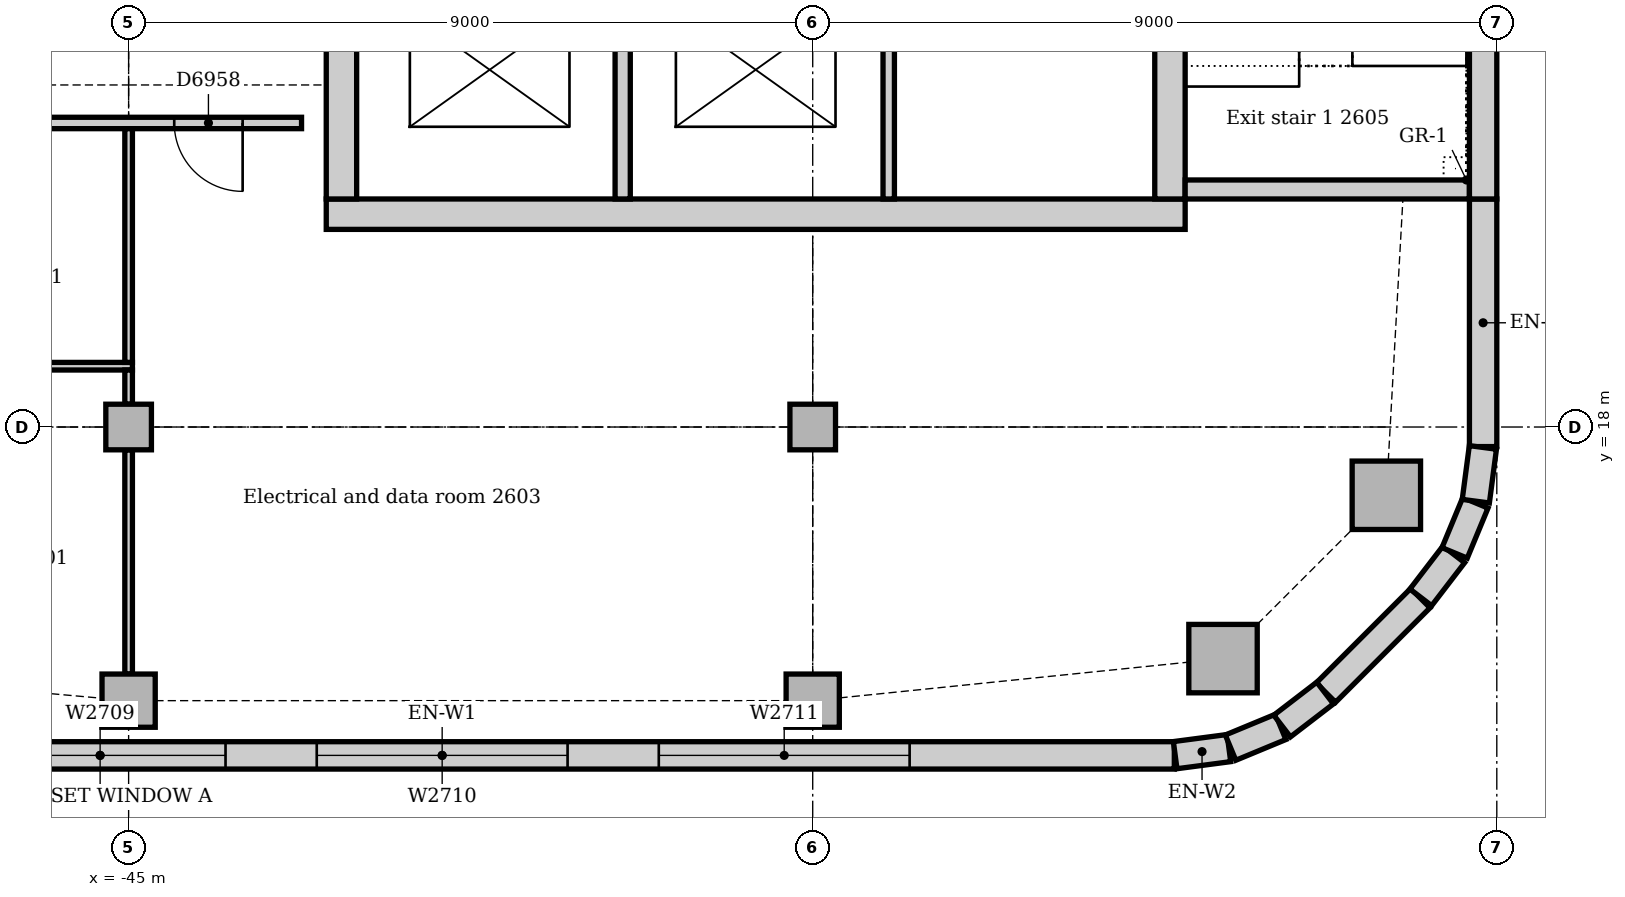
"""IFC4 building model, lengths in metres.
Left out: names, types, materials, properties, quantities, classifications, styles, units other than length and angle.
Written with IfcOpenShell. Run it as: python <this file> out.ifc"""

import sys

from ifc_helpers import new_model, si_unit, direction, frame, frame_2d, origin, origin_2d, place, context, subcontext, project, spatial, rectangle, extrude, element, fill, save


model = new_model("IFC4")
c1 = context("Model", 3, precision=1e-05, world=origin(), true_north=direction((0.0, 1.0)))
c2 = subcontext(c1, "Body", "Model", "MODEL_VIEW")
j1 = project(units=[si_unit("LENGTHUNIT", "METRE"), si_unit("PLANEANGLEUNIT", "RADIAN")], contexts=[c1])
p1 = place(None, origin())
s1 = spatial("IfcSite", under=j1, at=p1, CompositionType="ELEMENT")
p2 = place(p1, origin())
s2 = spatial("IfcBuilding", under=s1, at=p2, CompositionType="ELEMENT")
p3 = place(p2, frame((0.0, 0.0, 112.0)))
s3 = spatial("IfcBuildingStorey", under=s2, at=p3, CompositionType="ELEMENT", Elevation=112.0)
p4 = place(p3, frame((-42.4, 20.8, 0.0), z_axis=(0.0, 0.0, 1.0), x_axis=(1.0, 0.0, 0.0)))
e1 = element("IfcWall", 1, at=p4, inside=s3, PredefinedType="SOLIDWALL", context=c2, shape_type="SweptSolid", body=[
    extrude(rectangle(XDim=11.3, YDim=0.4, at=frame_2d((5.65, 0.0))), origin(), (0.0, 0.0, 1.0), 4.0),
])
p5 = place(p3, frame((-31.3, 21.0, 0.0), z_axis=(0.0, 0.0, 1.0), x_axis=(0.0, 1.0, 0.0)))
e2 = element("IfcWall", 2, at=p5, inside=s3, PredefinedType="SOLIDWALL", context=c2, shape_type="SweptSolid", body=[
    extrude(rectangle(XDim=9.5, YDim=0.4, at=frame_2d((4.75, 0.0))), origin(), (0.0, 0.0, 1.0), 4.0),
])
p6 = place(p5, frame((5.25, 0.0, 0.0)))
e3 = element("IfcOpeningElement", 3, at=p6, cuts=e2, PredefinedType="OPENING", context=c2, shape_type="SweptSolid", body=[
    extrude(rectangle(XDim=1.0, YDim=2.1, at=frame_2d((0.5, 1.05))), frame((0.0, 0.21, 0.0), z_axis=(0.0, -1.0, 0.0), x_axis=(1.0, 0.0, 0.0)), (0.0, 0.0, 1.0), 0.42),
])
p7 = place(p3, frame((-42.2, 30.5, 0.0), z_axis=(0.0, 0.0, 1.0), x_axis=(0.0, -1.0, 0.0)))
e4 = element("IfcWall", 4, at=p7, inside=s3, PredefinedType="SOLIDWALL", context=c2, shape_type="SweptSolid", body=[
    extrude(rectangle(XDim=9.5, YDim=0.4, at=frame_2d((4.75, 0.0))), origin(), (0.0, 0.0, 1.0), 4.0),
])
p8 = place(p7, frame((3.85, 0.0, 0.0)))
e5 = element("IfcOpeningElement", 5, at=p8, cuts=e4, PredefinedType="OPENING", context=c2, shape_type="SweptSolid", body=[
    extrude(rectangle(XDim=1.8, YDim=2.1, at=frame_2d((0.9, 1.05))), frame((0.0, 0.21, 0.0), z_axis=(0.0, -1.0, 0.0), x_axis=(1.0, 0.0, 0.0)), (0.0, 0.0, 1.0), 0.42),
])
p9 = place(p3, frame((-31.1, 21.125, 0.0), z_axis=(0.0, 0.0, 1.0), x_axis=(1.0, 0.0, 0.0)))
e6 = element("IfcWall", 6, at=p9, inside=s3, PredefinedType="SOLIDWALL", context=c2, shape_type="SweptSolid", body=[
    extrude(rectangle(XDim=3.74, YDim=0.25, at=frame_2d((1.87, 0.0))), origin(), (0.0, 0.0, 1.0), 4.0),
])
for number, where, z_axis, x_axis in (
    (7, (-30.602, 14.953, 0.0), (0.0, 0.0, 1.0), (1.0, 0.0, 0.0)),
    (8, (-28.453, 17.102, 0.0), (0.0, 0.0, 1.0), (1.0, 0.0, 0.0)),
):
    element("IfcColumn", number, at=place(p3, frame(where, z_axis=z_axis, x_axis=x_axis)), inside=s3, PredefinedType="COLUMN", context=c2, shape_type="SweptSolid", body=[
        extrude(rectangle(XDim=0.9, YDim=0.9, at=origin_2d()), origin(), (0.0, 0.0, 1.0), 3.85),
    ])
for number, where, z_axis, x_axis in (
    (9, (-45.0, 14.4, 0.0), (0.0, 0.0, 1.0), (1.0, 0.0, 0.0)),
    (10, (-36.0, 14.4, 0.0), (0.0, 0.0, 1.0), (1.0, 0.0, 0.0)),
):
    element("IfcColumn", number, at=place(p3, frame(where, z_axis=z_axis, x_axis=x_axis)), inside=s3, PredefinedType="COLUMN", context=c2, shape_type="SweptSolid", body=[
        extrude(rectangle(XDim=0.7, YDim=0.7, at=origin_2d()), origin(), (0.0, 0.0, 1.0), 3.85),
    ])
for number, where, z_axis, x_axis in (
    (11, (-45.0, 18.0, 0.0), (0.0, 0.0, 1.0), (1.0, 0.0, 0.0)),
    (12, (-36.0, 18.0, 0.0), (0.0, 0.0, 1.0), (1.0, 0.0, 0.0)),
):
    element("IfcColumn", number, at=place(p3, frame(where, z_axis=z_axis, x_axis=x_axis)), inside=s3, PredefinedType="COLUMN", context=c2, shape_type="SweptSolid", body=[
        extrude(rectangle(XDim=0.6, YDim=0.6, at=origin_2d()), origin(), (0.0, 0.0, 1.0), 3.85),
    ])
p10 = place(p3, frame((-50.507, 13.68, 0.0), z_axis=(0.0, 0.0, 1.0), x_axis=(1.0, 0.0, 0.0)))
e13 = element("IfcWall", 13, at=p10, inside=s3, PredefinedType="STANDARD", context=c2, shape_type="SweptSolid", body=[
    extrude(rectangle(XDim=19.265, YDim=0.36, at=frame_2d((9.632, 0.0))), origin(), (0.0, 0.0, 1.0), 3.85),
])
p11 = place(p10, frame((3.482, 0.0, 0.9)))
e14 = element("IfcOpeningElement", 14, at=p11, cuts=e13, PredefinedType="OPENING", context=c2, shape_type="SweptSolid", body=[
    extrude(rectangle(XDim=3.3, YDim=1.6, at=frame_2d((1.65, 0.8))), frame((0.0, 0.19, 0.0), z_axis=(0.0, -1.0, 0.0), x_axis=(1.0, 0.0, 0.0)), (0.0, 0.0, 1.0), 0.38),
])
p12 = place(p10, frame((7.982, 0.0, 0.9)))
e15 = element("IfcOpeningElement", 15, at=p12, cuts=e13, PredefinedType="OPENING", context=c2, shape_type="SweptSolid", body=[
    extrude(rectangle(XDim=3.3, YDim=1.6, at=frame_2d((1.65, 0.8))), frame((0.0, 0.19, 0.0), z_axis=(0.0, -1.0, 0.0), x_axis=(1.0, 0.0, 0.0)), (0.0, 0.0, 1.0), 0.38),
])
p13 = place(p10, frame((12.482, 0.0, 0.9)))
e16 = element("IfcOpeningElement", 16, at=p13, cuts=e13, PredefinedType="OPENING", context=c2, shape_type="SweptSolid", body=[
    extrude(rectangle(XDim=3.3, YDim=1.6, at=frame_2d((1.65, 0.8))), frame((0.0, 0.19, 0.0), z_axis=(0.0, -1.0, 0.0), x_axis=(1.0, 0.0, 0.0)), (0.0, 0.0, 1.0), 0.38),
])
p14 = place(p3, frame((-29.249, 14.506, 0.0), z_axis=(0.0, 0.0, 1.0), x_axis=(0.707106781187, 0.707106781187, 0.0)))
e17 = element("IfcWall", 17, at=p14, inside=s3, PredefinedType="STANDARD", context=c2, shape_type="SweptSolid", body=[
    extrude(rectangle(XDim=1.757, YDim=0.36, at=frame_2d((0.879, 0.0))), origin(), (0.0, 0.0, 1.0), 3.85),
])
p15 = place(p3, frame((-27.18, 17.743, 0.0), z_axis=(0.0, 0.0, 1.0), x_axis=(0.0, 1.0, 0.0)))
e18 = element("IfcWall", 18, at=p15, inside=s3, PredefinedType="STANDARD", context=c2, shape_type="SweptSolid", body=[
    extrude(rectangle(XDim=3.257, YDim=0.36, at=frame_2d((1.629, 0.0))), origin(), (0.0, 0.0, 1.0), 3.85),
])
p16 = place(p3, frame((-27.18, 21.0, 0.0), z_axis=(0.0, 0.0, 1.0), x_axis=(0.0, 1.0, 0.0)))
e19 = element("IfcWall", 19, at=p16, inside=s3, PredefinedType="STANDARD", context=c2, shape_type="SweptSolid", body=[
    extrude(rectangle(XDim=6.75, YDim=0.36, at=frame_2d((3.375, 0.0))), origin(), (0.0, 0.0, 1.0), 3.85),
])
for number, where, z_axis, x_axis in (
    (20, (-31.231, 13.683, 0.0), (0.0, 0.0, 1.0), (0.991, 0.131, 0.0)),
    (21, (-30.503, 13.782, 0.0), (0.0, 0.0, 1.0), (0.924, 0.383, 0.0)),
):
    element("IfcWall", number, at=place(p3, frame(where, z_axis=z_axis, x_axis=x_axis)), inside=s3, PredefinedType="STANDARD", context=c2, shape_type="SweptSolid", body=[
        extrude(rectangle(XDim=0.713, YDim=0.36, at=frame_2d((0.356, 0.0))), origin(), (0.0, 0.0, 1.0), 3.85),
    ])
for number, where, z_axis, x_axis in (
    (22, (-29.825, 14.066, 0.0), (0.0, 0.0, 1.0), (0.793, 0.609, 0.0)),
    (23, (-28.0, 15.759, 0.0), (0.0, 0.0, 1.0), (0.609, 0.793, 0.0)),
):
    element("IfcWall", number, at=place(p3, frame(where, z_axis=z_axis, x_axis=x_axis)), inside=s3, PredefinedType="STANDARD", context=c2, shape_type="SweptSolid", body=[
        extrude(rectangle(XDim=0.713, YDim=0.36, at=frame_2d((0.357, 0.0))), origin(), (0.0, 0.0, 1.0), 3.85),
    ])
for number, where, z_axis, x_axis in (
    (24, (-27.555, 16.344, 0.0), (0.0, 0.0, 1.0), (0.383, 0.924, 0.0)),
    (25, (-27.276, 17.024, 0.0), (0.0, 0.0, 1.0), (0.131, 0.991, 0.0)),
):
    element("IfcWall", number, at=place(p3, frame(where, z_axis=z_axis, x_axis=x_axis)), inside=s3, PredefinedType="STANDARD", context=c2, shape_type="SweptSolid", body=[
        extrude(rectangle(XDim=0.713, YDim=0.36, at=frame_2d((0.356, 0.0))), origin(), (0.0, 0.0, 1.0), 3.85),
    ])
p17 = place(p3, frame((-38.5, 21.0, 0.0), z_axis=(0.0, 0.0, 1.0), x_axis=(0.0, 1.0, 0.0)))
e26 = element("IfcWall", 26, at=p17, inside=s3, PredefinedType="SOLIDWALL", context=c2, shape_type="SweptSolid", body=[
    extrude(rectangle(XDim=3.1, YDim=0.2, at=frame_2d((1.55, 0.0))), origin(), (0.0, 0.0, 1.0), 4.0),
])
p18 = place(p3, frame((-35.0, 21.0, 0.0), z_axis=(0.0, 0.0, 1.0), x_axis=(0.0, 1.0, 0.0)))
e27 = element("IfcWall", 27, at=p18, inside=s3, PredefinedType="SOLIDWALL", context=c2, shape_type="SweptSolid", body=[
    extrude(rectangle(XDim=2.9, YDim=0.15, at=frame_2d((1.45, 0.0))), origin(), (0.0, 0.0, 1.0), 4.0),
])
p19 = place(p3, frame((-59.766, 22.0, 0.0), z_axis=(0.0, 0.0, 1.0), x_axis=(1.0, 0.0, 0.0)))
e28 = element("IfcWall", 28, at=p19, inside=s3, PredefinedType="PARTITIONING", context=c2, shape_type="SweptSolid", body=[
    extrude(rectangle(XDim=17.041, YDim=0.15, at=frame_2d((8.52, 0.0))), origin(), (0.0, 0.0, 1.0), 3.85),
])
p20 = place(p19, frame((15.366, 0.0, 0.0)))
e29 = element("IfcOpeningElement", 29, at=p20, cuts=e28, PredefinedType="OPENING", context=c2, shape_type="SweptSolid", body=[
    extrude(rectangle(XDim=0.9, YDim=2.1, at=frame_2d((0.45, 1.05))), frame((0.0, 0.085, 0.0), z_axis=(0.0, -1.0, 0.0), x_axis=(1.0, 0.0, 0.0)), (0.0, 0.0, 1.0), 0.17),
])
p21 = place(p19, frame((2.5, 0.0, 0.0)))
e30 = element("IfcOpeningElement", 30, at=p21, cuts=e28, PredefinedType="OPENING", context=c2, shape_type="SweptSolid", body=[
    extrude(rectangle(XDim=0.9, YDim=2.1, at=frame_2d((0.45, 1.05))), frame((0.0, 0.085, 0.0), z_axis=(0.0, -1.0, 0.0), x_axis=(1.0, 0.0, 0.0)), (0.0, 0.0, 1.0), 0.17),
])
p22 = place(p19, frame((9.056, 0.0, 0.0)))
e31 = element("IfcOpeningElement", 31, at=p22, cuts=e28, PredefinedType="OPENING", context=c2, shape_type="SweptSolid", body=[
    extrude(rectangle(XDim=1.0, YDim=2.1, at=frame_2d((0.5, 1.05))), frame((0.0, 0.085, 0.0), z_axis=(0.0, -1.0, 0.0), x_axis=(1.0, 0.0, 0.0)), (0.0, 0.0, 1.0), 0.17),
])
p23 = place(p3, frame((-54.05, 18.8, 0.0), z_axis=(0.0, 0.0, 1.0), x_axis=(1.0, 0.0, 0.0)))
e32 = element("IfcWall", 32, at=p23, inside=s3, PredefinedType="PARTITIONING", context=c2, shape_type="SweptSolid", body=[
    extrude(rectangle(XDim=9.1, YDim=0.1, at=frame_2d((4.55, 0.0))), origin(), (0.0, 0.0, 1.0), 3.85),
])
p24 = place(p23, frame((3.39, 0.0, 0.0)))
e33 = element("IfcOpeningElement", 33, at=p24, cuts=e32, PredefinedType="OPENING", context=c2, shape_type="SweptSolid", body=[
    extrude(rectangle(XDim=0.9, YDim=2.1, at=frame_2d((0.45, 1.05))), frame((0.0, 0.06, 0.0), z_axis=(0.0, -1.0, 0.0), x_axis=(1.0, 0.0, 0.0)), (0.0, 0.0, 1.0), 0.12),
])
p25 = place(p3, frame((-45.0, 18.85, 0.0), z_axis=(0.0, 0.0, 1.0), x_axis=(0.0, 1.0, 0.0)))
e34 = element("IfcWall", 34, at=p25, inside=s3, PredefinedType="PARTITIONING", context=c2, shape_type="SweptSolid", body=[
    extrude(rectangle(XDim=3.075, YDim=0.1, at=frame_2d((1.538, 0.0))), origin(), (0.0, 0.0, 1.0), 3.362),
])
p26 = place(p3, frame((-45.0, 18.3, 0.0), z_axis=(0.0, 0.0, 1.0), x_axis=(0.0, 1.0, 0.0)))
e35 = element("IfcWall", 35, at=p26, inside=s3, PredefinedType="PARTITIONING", context=c2, shape_type="SweptSolid", body=[
    extrude(rectangle(XDim=0.45, YDim=0.1, at=frame_2d((0.225, 0.0))), origin(), (0.0, 0.0, 1.0), 3.85),
])
p27 = place(p3, frame((-45.0, 14.75, 0.0), z_axis=(0.0, 0.0, 1.0), x_axis=(0.0, 1.0, 0.0)))
e36 = element("IfcWall", 36, at=p27, inside=s3, PredefinedType="PARTITIONING", context=c2, shape_type="SweptSolid", body=[
    extrude(rectangle(XDim=2.95, YDim=0.1, at=frame_2d((1.475, 0.0))), origin(), (0.0, 0.0, 1.0), 3.652),
])
p28 = place(p11, origin())
e37 = element("IfcWindow", 37, at=p28, inside=s3, PartitioningType="SINGLE_PANEL", PredefinedType="WINDOW", context=c2, shape_type="SweptSolid", body=[
    extrude(rectangle(XDim=3.3, YDim=1.6, at=frame_2d((1.65, 0.8))), frame((0.0, 0.13, 0.0), z_axis=(0.0, -1.0, 0.0), x_axis=(1.0, 0.0, 0.0)), (0.0, 0.0, 1.0), 0.06),
])
fill(e14, e37)
p29 = place(p12, origin())
e38 = element("IfcWindow", 38, at=p29, inside=s3, PartitioningType="SINGLE_PANEL", PredefinedType="WINDOW", context=c2, shape_type="SweptSolid", body=[
    extrude(rectangle(XDim=3.3, YDim=1.6, at=frame_2d((1.65, 0.8))), frame((0.0, 0.13, 0.0), z_axis=(0.0, -1.0, 0.0), x_axis=(1.0, 0.0, 0.0)), (0.0, 0.0, 1.0), 0.06),
])
fill(e15, e38)
p30 = place(p13, origin())
e39 = element("IfcWindow", 39, at=p30, inside=s3, PartitioningType="SINGLE_PANEL", PredefinedType="WINDOW", context=c2, shape_type="SweptSolid", body=[
    extrude(rectangle(XDim=3.3, YDim=1.6, at=frame_2d((1.65, 0.8))), frame((0.0, 0.13, 0.0), z_axis=(0.0, -1.0, 0.0), x_axis=(1.0, 0.0, 0.0)), (0.0, 0.0, 1.0), 0.06),
])
fill(e16, e39)
p31 = place(p20, frame((0.9, 0.0, 0.0), z_axis=(0.0, 0.0, 1.0), x_axis=(-1.0, 0.0, 0.0)))
e40 = element("IfcDoor", 40, at=p31, inside=s3, OperationType="SINGLE_SWING_LEFT", PredefinedType="DOOR", context=c2, shape_type="SweptSolid", body=[
    extrude(rectangle(XDim=0.9, YDim=2.1, at=frame_2d((0.45, 1.05))), frame((0.0, 0.025, 0.0), z_axis=(0.0, -1.0, 0.0), x_axis=(1.0, 0.0, 0.0)), (0.0, 0.0, 1.0), 0.05),
])
fill(e29, e40)
save(model, sys.argv[1])
